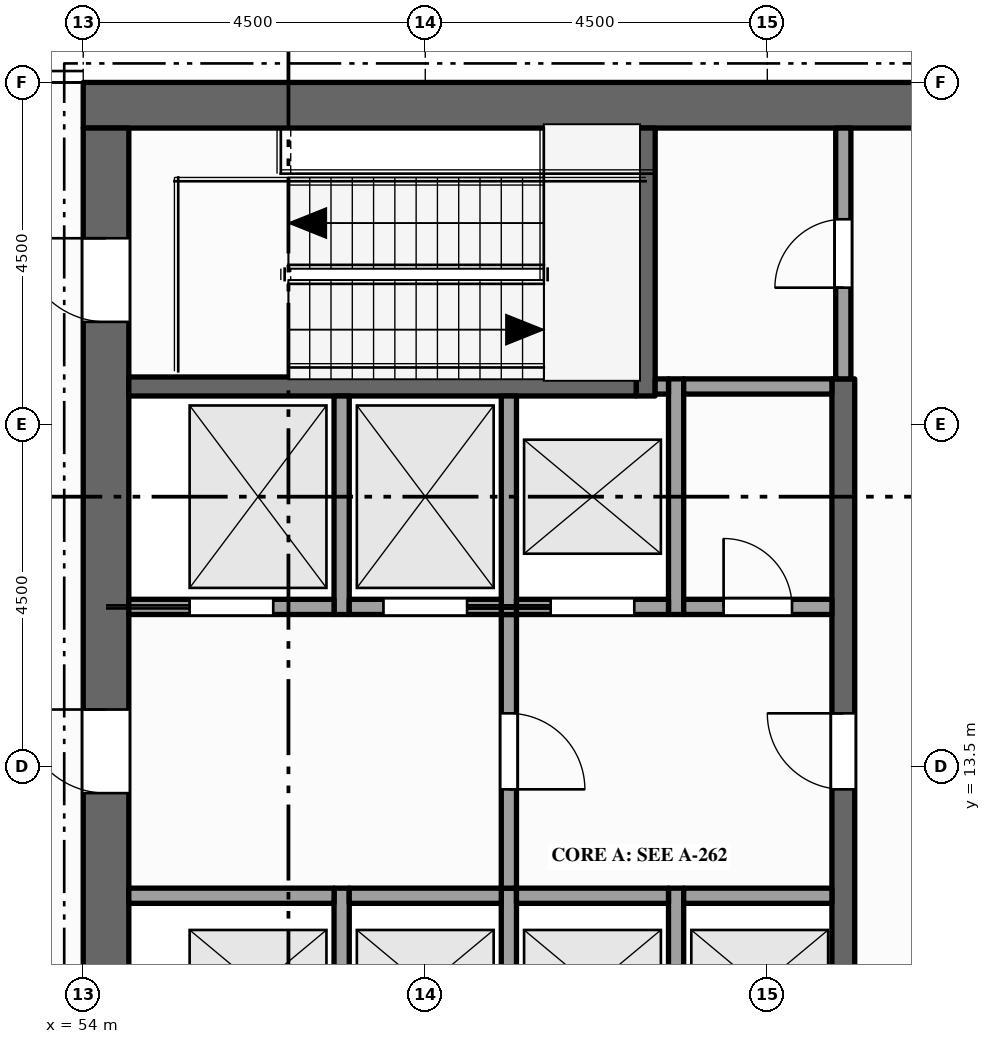
"""IFC4 building model, lengths in metres.
Left out: names, types, materials, properties, quantities, classifications, styles, units other than length and angle.
Written with IfcOpenShell. Run it as: python <this file> out.ifc"""

import sys

from ifc_helpers import new_model, si_unit, direction, frame, frame_2d, origin, place, context, subcontext, project, spatial, rectangle, extrude, element, fill, save


model = new_model("IFC4")
c1 = context("Model", 3, precision=1e-05, world=origin(), true_north=direction((0.0, 1.0)))
c2 = subcontext(c1, "Body", "Model", "MODEL_VIEW")
j1 = project(units=[si_unit("LENGTHUNIT", "METRE"), si_unit("PLANEANGLEUNIT", "RADIAN")], contexts=[c1])
p1 = place(None, origin())
s1 = spatial("IfcSite", under=j1, at=p1, CompositionType="ELEMENT")
p2 = place(p1, origin())
s2 = spatial("IfcBuilding", under=s1, at=p2, CompositionType="ELEMENT")
p3 = place(p2, frame((0.0, 0.0, 341.0)))
s3 = spatial("IfcBuildingStorey", under=s2, at=p3, CompositionType="ELEMENT", Elevation=341.0)
p4 = place(p3, frame((54.0, 22.2, -0.15), z_axis=(0.0, 0.0, 1.0), x_axis=(1.0, 0.0, 0.0)))
e1 = element("IfcWall", 1, at=p4, inside=s3, PredefinedType="SHEAR", context=c2, shape_type="SweptSolid", body=[
    extrude(rectangle(XDim=13.5, YDim=0.6, at=frame_2d((6.75, 0.0))), origin(), (0.0, 0.0, 1.0), 4.5),
])
p5 = place(p3, frame((54.3, 0.6, -0.15), z_axis=(0.0, 0.0, 1.0), x_axis=(0.0, 1.0, 0.0)))
e2 = element("IfcWall", 2, at=p5, inside=s3, PredefinedType="SHEAR", context=c2, shape_type="SweptSolid", body=[
    extrude(rectangle(XDim=21.3, YDim=0.6, at=frame_2d((10.65, 0.0))), origin(), (0.0, 0.0, 1.0), 4.5),
])
p6 = place(p5, frame((6.5, 0.0, 0.15)))
e3 = element("IfcOpeningElement", 3, at=p6, cuts=e2, PredefinedType="OPENING", context=c2, shape_type="SweptSolid", body=[
    extrude(rectangle(XDim=1.8, YDim=2.1, at=frame_2d((0.9, 1.05))), frame((0.0, 0.31, 0.0), z_axis=(0.0, -1.0, 0.0), x_axis=(1.0, 0.0, 0.0)), (0.0, 0.0, 1.0), 0.62),
])
p7 = place(p5, frame((12.55, 0.0, 0.15)))
e4 = element("IfcOpeningElement", 4, at=p7, cuts=e2, PredefinedType="OPENING", context=c2, shape_type="SweptSolid", body=[
    extrude(rectangle(XDim=1.1, YDim=2.1, at=frame_2d((0.55, 1.05))), frame((0.0, 0.31, 0.0), z_axis=(0.0, -1.0, 0.0), x_axis=(1.0, 0.0, 0.0)), (0.0, 0.0, 1.0), 0.62),
])
p8 = place(p5, frame((1.55, 0.0, 0.15)))
e5 = element("IfcOpeningElement", 5, at=p8, cuts=e2, PredefinedType="OPENING", context=c2, shape_type="SweptSolid", body=[
    extrude(rectangle(XDim=1.1, YDim=2.1, at=frame_2d((0.55, 1.05))), frame((0.0, 0.31, 0.0), z_axis=(0.0, -1.0, 0.0), x_axis=(1.0, 0.0, 0.0)), (0.0, 0.0, 1.0), 0.62),
])
p9 = place(p5, frame((18.75, 0.0, 0.15)))
e6 = element("IfcOpeningElement", 6, at=p9, cuts=e2, PredefinedType="OPENING", context=c2, shape_type="SweptSolid", body=[
    extrude(rectangle(XDim=1.1, YDim=2.1, at=frame_2d((0.55, 1.05))), frame((0.0, 0.31, 0.0), z_axis=(0.0, -1.0, 0.0), x_axis=(1.0, 0.0, 0.0)), (0.0, 0.0, 1.0), 0.62),
])
p10 = place(p3, frame((57.4, 9.3, 0.0), z_axis=(0.0, 0.0, 1.0), x_axis=(0.0, 1.0, 0.0)))
e7 = element("IfcWall", 7, at=p10, inside=s3, PredefinedType="SOLIDWALL", context=c2, shape_type="SweptSolid", body=[
    extrude(rectangle(XDim=2.6, YDim=0.2, at=frame_2d((1.3, 0.0))), origin(), (0.0, 0.0, 1.0), 4.3),
])
p11 = place(p3, frame((57.4, 15.5, 0.0), z_axis=(0.0, 0.0, 1.0), x_axis=(0.0, 1.0, 0.0)))
e8 = element("IfcWall", 8, at=p11, inside=s3, PredefinedType="SOLIDWALL", context=c2, shape_type="SweptSolid", body=[
    extrude(rectangle(XDim=2.875, YDim=0.2, at=frame_2d((1.438, 0.0))), origin(), (0.0, 0.0, 1.0), 4.3),
])
p12 = place(p3, frame((59.6, 9.3, 0.0), z_axis=(0.0, 0.0, 1.0), x_axis=(0.0, 1.0, 0.0)))
e9 = element("IfcWall", 9, at=p12, inside=s3, PredefinedType="SOLIDWALL", context=c2, shape_type="SweptSolid", body=[
    extrude(rectangle(XDim=2.6, YDim=0.2, at=frame_2d((1.3, 0.0))), origin(), (0.0, 0.0, 1.0), 4.3),
])
p13 = place(p3, frame((59.6, 11.9, 0.0), z_axis=(0.0, 0.0, 1.0), x_axis=(0.0, 1.0, 0.0)))
e10 = element("IfcWall", 10, at=p13, inside=s3, PredefinedType="PARTITIONING", context=c2, shape_type="SweptSolid", body=[
    extrude(rectangle(XDim=3.6, YDim=0.2, at=frame_2d((1.8, 0.0))), origin(), (0.0, 0.0, 1.0), 4.3),
])
p14 = place(p13, frame((1.3, 0.0, 0.0)))
e11 = element("IfcOpeningElement", 11, at=p14, cuts=e10, PredefinedType="OPENING", context=c2, shape_type="SweptSolid", body=[
    extrude(rectangle(XDim=1.0, YDim=2.1, at=frame_2d((0.5, 1.05))), frame((0.0, 0.11, 0.0), z_axis=(0.0, -1.0, 0.0), x_axis=(1.0, 0.0, 0.0)), (0.0, 0.0, 1.0), 0.22),
])
p15 = place(p3, frame((59.6, 15.5, 0.0), z_axis=(0.0, 0.0, 1.0), x_axis=(0.0, 1.0, 0.0)))
e12 = element("IfcWall", 12, at=p15, inside=s3, PredefinedType="SOLIDWALL", context=c2, shape_type="SweptSolid", body=[
    extrude(rectangle(XDim=2.875, YDim=0.2, at=frame_2d((1.438, 0.0))), origin(), (0.0, 0.0, 1.0), 4.3),
])
p16 = place(p3, frame((61.4, 18.375, 0.0), z_axis=(0.0, 0.0, 1.0), x_axis=(0.0, 1.0, 0.0)))
e13 = element("IfcWall", 13, at=p16, inside=s3, PredefinedType="SHEAR", context=c2, shape_type="SweptSolid", body=[
    extrude(rectangle(XDim=3.525, YDim=0.25, at=frame_2d((1.762, 0.0))), origin(), (0.0, 0.0, 1.0), 4.3),
])
p17 = place(p3, frame((61.8, 9.3, 0.0), z_axis=(0.0, 0.0, 1.0), x_axis=(0.0, 1.0, 0.0)))
e14 = element("IfcWall", 14, at=p17, inside=s3, PredefinedType="SOLIDWALL", context=c2, shape_type="SweptSolid", body=[
    extrude(rectangle(XDim=2.6, YDim=0.2, at=frame_2d((1.3, 0.0))), origin(), (0.0, 0.0, 1.0), 4.3),
])
p18 = place(p3, frame((61.8, 15.5, 0.0), z_axis=(0.0, 0.0, 1.0), x_axis=(0.0, 1.0, 0.0)))
e15 = element("IfcWall", 15, at=p18, inside=s3, PredefinedType="SOLIDWALL", context=c2, shape_type="SweptSolid", body=[
    extrude(rectangle(XDim=3.1, YDim=0.2, at=frame_2d((1.55, 0.0))), origin(), (0.0, 0.0, 1.0), 4.3),
])
p19 = place(p3, frame((64.0, 4.1, 0.0), z_axis=(0.0, 0.0, 1.0), x_axis=(0.0, 1.0, 0.0)))
e16 = element("IfcWall", 16, at=p19, inside=s3, PredefinedType="SHEAR", context=c2, shape_type="SweptSolid", body=[
    extrude(rectangle(XDim=14.5, YDim=0.3, at=frame_2d((7.25, 0.0))), origin(), (0.0, 0.0, 1.0), 4.3),
])
p20 = place(p19, frame((3.4, 0.0, 0.0)))
e17 = element("IfcOpeningElement", 17, at=p20, cuts=e16, PredefinedType="OPENING", context=c2, shape_type="SweptSolid", body=[
    extrude(rectangle(XDim=1.0, YDim=2.1, at=frame_2d((0.5, 1.05))), frame((0.0, 0.16, 0.0), z_axis=(0.0, -1.0, 0.0), x_axis=(1.0, 0.0, 0.0)), (0.0, 0.0, 1.0), 0.32),
])
p21 = place(p19, frame((9.1, 0.0, 0.0)))
e18 = element("IfcOpeningElement", 18, at=p21, cuts=e16, PredefinedType="OPENING", context=c2, shape_type="SweptSolid", body=[
    extrude(rectangle(XDim=1.0, YDim=2.1, at=frame_2d((0.5, 1.05))), frame((0.0, 0.16, 0.0), z_axis=(0.0, -1.0, 0.0), x_axis=(1.0, 0.0, 0.0)), (0.0, 0.0, 1.0), 0.32),
])
p22 = place(p3, frame((64.0, 18.6, 0.0), z_axis=(0.0, 0.0, 1.0), x_axis=(0.0, 1.0, 0.0)))
e19 = element("IfcWall", 19, at=p22, inside=s3, PredefinedType="PARTITIONING", context=c2, shape_type="SweptSolid", body=[
    extrude(rectangle(XDim=3.3, YDim=0.2, at=frame_2d((1.65, 0.0))), origin(), (0.0, 0.0, 1.0), 4.3),
])
p23 = place(p22, frame((1.2, 0.0, 0.0)))
e20 = element("IfcOpeningElement", 20, at=p23, cuts=e19, PredefinedType="OPENING", context=c2, shape_type="SweptSolid", body=[
    extrude(rectangle(XDim=0.9, YDim=2.1, at=frame_2d((0.45, 1.05))), frame((0.0, 0.11, 0.0), z_axis=(0.0, -1.0, 0.0), x_axis=(1.0, 0.0, 0.0)), (0.0, 0.0, 1.0), 0.22),
])
p24 = place(p3, frame((54.6, 11.8, 0.0), z_axis=(0.0, 0.0, 1.0), x_axis=(1.0, 0.0, 0.0)))
e21 = element("IfcWall", 21, at=p24, inside=s3, PredefinedType="SOLIDWALL", context=c2, shape_type="SweptSolid", body=[
    extrude(rectangle(XDim=2.7, YDim=0.2, at=frame_2d((1.35, 0.0))), origin(), (0.0, 0.0, 1.0), 4.3),
])
for number, where, z_axis, x_axis in (
    (22, (57.5, 11.8, 0.0), (0.0, 0.0, 1.0), (1.0, 0.0, 0.0)),
    (23, (59.7, 11.8, 0.0), (0.0, 0.0, 1.0), (1.0, 0.0, 0.0)),
):
    element("IfcWall", number, at=place(p3, frame(where, z_axis=z_axis, x_axis=x_axis)), inside=s3, PredefinedType="SOLIDWALL", context=c2, shape_type="SweptSolid", body=[
        extrude(rectangle(XDim=2.0, YDim=0.2, at=frame_2d((1.0, 0.0))), origin(), (0.0, 0.0, 1.0), 4.3),
    ])
p25 = place(p3, frame((61.9, 11.8, 0.0), z_axis=(0.0, 0.0, 1.0), x_axis=(1.0, 0.0, 0.0)))
e24 = element("IfcWall", 24, at=p25, inside=s3, PredefinedType="SOLIDWALL", context=c2, shape_type="SweptSolid", body=[
    extrude(rectangle(XDim=1.95, YDim=0.2, at=frame_2d((0.975, 0.0))), origin(), (0.0, 0.0, 1.0), 4.3),
])
p26 = place(p3, frame((54.6, 15.6, 0.0), z_axis=(0.0, 0.0, 1.0), x_axis=(1.0, 0.0, 0.0)))
e25 = element("IfcWall", 25, at=p26, inside=s3, PredefinedType="SOLIDWALL", context=c2, shape_type="SweptSolid", body=[
    extrude(rectangle(XDim=2.7, YDim=0.2, at=frame_2d((1.35, 0.0))), origin(), (0.0, 0.0, 1.0), 4.3),
])
p27 = place(p26, frame((0.8, 0.0, 0.012)))
e26 = element("IfcOpeningElement", 26, at=p27, cuts=e25, PredefinedType="OPENING", context=c2, shape_type="SweptSolid", body=[
    extrude(rectangle(XDim=1.1, YDim=2.1, at=frame_2d((0.55, 1.05))), frame((0.0, 0.11, 0.0), z_axis=(0.0, -1.0, 0.0), x_axis=(1.0, 0.0, 0.0)), (0.0, 0.0, 1.0), 0.22),
])
p28 = place(p3, frame((57.5, 15.6, 0.0), z_axis=(0.0, 0.0, 1.0), x_axis=(1.0, 0.0, 0.0)))
e27 = element("IfcWall", 27, at=p28, inside=s3, PredefinedType="SOLIDWALL", context=c2, shape_type="SweptSolid", body=[
    extrude(rectangle(XDim=2.0, YDim=0.2, at=frame_2d((1.0, 0.0))), origin(), (0.0, 0.0, 1.0), 4.3),
])
p29 = place(p28, frame((0.45, 0.0, 0.012)))
e28 = element("IfcOpeningElement", 28, at=p29, cuts=e27, PredefinedType="OPENING", context=c2, shape_type="SweptSolid", body=[
    extrude(rectangle(XDim=1.1, YDim=2.1, at=frame_2d((0.55, 1.05))), frame((0.0, 0.11, 0.0), z_axis=(0.0, -1.0, 0.0), x_axis=(1.0, 0.0, 0.0)), (0.0, 0.0, 1.0), 0.22),
])
p30 = place(p3, frame((59.7, 15.6, 0.0), z_axis=(0.0, 0.0, 1.0), x_axis=(1.0, 0.0, 0.0)))
e29 = element("IfcWall", 29, at=p30, inside=s3, PredefinedType="SOLIDWALL", context=c2, shape_type="SweptSolid", body=[
    extrude(rectangle(XDim=2.0, YDim=0.2, at=frame_2d((1.0, 0.0))), origin(), (0.0, 0.0, 1.0), 4.3),
])
p31 = place(p30, frame((0.45, 0.0, 0.012)))
e30 = element("IfcOpeningElement", 30, at=p31, cuts=e29, PredefinedType="OPENING", context=c2, shape_type="SweptSolid", body=[
    extrude(rectangle(XDim=1.1, YDim=2.1, at=frame_2d((0.55, 1.05))), frame((0.0, 0.11, 0.0), z_axis=(0.0, -1.0, 0.0), x_axis=(1.0, 0.0, 0.0)), (0.0, 0.0, 1.0), 0.22),
])
p32 = place(p3, frame((61.9, 15.6, 0.0), z_axis=(0.0, 0.0, 1.0), x_axis=(1.0, 0.0, 0.0)))
e31 = element("IfcWall", 31, at=p32, inside=s3, PredefinedType="PARTITIONING", context=c2, shape_type="SweptSolid", body=[
    extrude(rectangle(XDim=1.95, YDim=0.2, at=frame_2d((0.975, 0.0))), origin(), (0.0, 0.0, 1.0), 4.3),
])
p33 = place(p32, frame((0.525, 0.0, 0.0)))
e32 = element("IfcOpeningElement", 32, at=p33, cuts=e31, PredefinedType="OPENING", context=c2, shape_type="SweptSolid", body=[
    extrude(rectangle(XDim=0.9, YDim=2.1, at=frame_2d((0.45, 1.05))), frame((0.0, 0.11, 0.0), z_axis=(0.0, -1.0, 0.0), x_axis=(1.0, 0.0, 0.0)), (0.0, 0.0, 1.0), 0.22),
])
p34 = place(p3, frame((54.6, 18.5, 0.0), z_axis=(0.0, 0.0, 1.0), x_axis=(1.0, 0.0, 0.0)))
e33 = element("IfcWall", 33, at=p34, inside=s3, PredefinedType="SHEAR", context=c2, shape_type="SweptSolid", body=[
    extrude(rectangle(XDim=6.675, YDim=0.25, at=frame_2d((3.337, 0.0))), origin(), (0.0, 0.0, 1.0), 4.3),
])
p35 = place(p3, frame((61.525, 18.5, 0.0), z_axis=(0.0, 0.0, 1.0), x_axis=(1.0, 0.0, 0.0)))
e34 = element("IfcWall", 34, at=p35, inside=s3, PredefinedType="SOLIDWALL", context=c2, shape_type="SweptSolid", body=[
    extrude(rectangle(XDim=0.175, YDim=0.2, at=frame_2d((0.087, 0.0))), origin(), (0.0, 0.0, 1.0), 4.3),
])
p36 = place(p3, frame((61.9, 18.5, 0.0), z_axis=(0.0, 0.0, 1.0), x_axis=(1.0, 0.0, 0.0)))
e35 = element("IfcWall", 35, at=p36, inside=s3, PredefinedType="PARTITIONING", context=c2, shape_type="SweptSolid", body=[
    extrude(rectangle(XDim=1.95, YDim=0.2, at=frame_2d((0.975, 0.0))), origin(), (0.0, 0.0, 1.0), 4.3),
])
p37 = place(p27, origin())
e36 = element("IfcDoor", 36, at=p37, inside=s3, OperationType="SLIDING_TO_LEFT", PredefinedType="DOOR", context=c2, shape_type="SweptSolid", body=[
    extrude(rectangle(XDim=1.1, YDim=2.1, at=frame_2d((0.55, 1.05))), frame((0.0, 0.025, 0.0), z_axis=(0.0, -1.0, 0.0), x_axis=(1.0, 0.0, 0.0)), (0.0, 0.0, 1.0), 0.05),
])
fill(e26, e36)
p38 = place(p29, origin())
e37 = element("IfcDoor", 37, at=p38, inside=s3, OperationType="SLIDING_TO_RIGHT", PredefinedType="DOOR", context=c2, shape_type="SweptSolid", body=[
    extrude(rectangle(XDim=1.1, YDim=2.1, at=frame_2d((0.55, 1.05))), frame((0.0, 0.025, 0.0), z_axis=(0.0, -1.0, 0.0), x_axis=(1.0, 0.0, 0.0)), (0.0, 0.0, 1.0), 0.05),
])
fill(e28, e37)
p39 = place(p31, origin())
e38 = element("IfcDoor", 38, at=p39, inside=s3, OperationType="SLIDING_TO_LEFT", PredefinedType="DOOR", context=c2, shape_type="SweptSolid", body=[
    extrude(rectangle(XDim=1.1, YDim=2.1, at=frame_2d((0.55, 1.05))), frame((0.0, 0.025, 0.0), z_axis=(0.0, -1.0, 0.0), x_axis=(1.0, 0.0, 0.0)), (0.0, 0.0, 1.0), 0.05),
])
fill(e30, e38)
p40 = place(p7, origin())
e39 = element("IfcDoor", 39, at=p40, inside=s3, OperationType="SINGLE_SWING_RIGHT", PredefinedType="DOOR", context=c2, shape_type="SweptSolid", body=[
    extrude(rectangle(XDim=1.1, YDim=2.1, at=frame_2d((0.55, 1.05))), frame((0.0, 0.025, 0.0), z_axis=(0.0, -1.0, 0.0), x_axis=(1.0, 0.0, 0.0)), (0.0, 0.0, 1.0), 0.05),
])
fill(e4, e39)
p41 = place(p14, origin())
e40 = element("IfcDoor", 40, at=p41, inside=s3, OperationType="SINGLE_SWING_LEFT", PredefinedType="DOOR", context=c2, shape_type="SweptSolid", body=[
    extrude(rectangle(XDim=1.0, YDim=2.1, at=frame_2d((0.5, 1.05))), frame((0.0, 0.025, 0.0), z_axis=(0.0, -1.0, 0.0), x_axis=(1.0, 0.0, 0.0)), (0.0, 0.0, 1.0), 0.05),
])
fill(e11, e40)
p42 = place(p21, origin())
e41 = element("IfcDoor", 41, at=p42, inside=s3, OperationType="SINGLE_SWING_RIGHT", PredefinedType="DOOR", context=c2, shape_type="SweptSolid", body=[
    extrude(rectangle(XDim=1.0, YDim=2.1, at=frame_2d((0.5, 1.05))), frame((0.0, 0.025, 0.0), z_axis=(0.0, -1.0, 0.0), x_axis=(1.0, 0.0, 0.0)), (0.0, 0.0, 1.0), 0.05),
])
fill(e18, e41)
p43 = place(p9, origin())
e42 = element("IfcDoor", 42, at=p43, inside=s3, OperationType="SINGLE_SWING_RIGHT", PredefinedType="DOOR", context=c2, shape_type="SweptSolid", body=[
    extrude(rectangle(XDim=1.1, YDim=2.1, at=frame_2d((0.55, 1.05))), frame((0.0, 0.025, 0.0), z_axis=(0.0, -1.0, 0.0), x_axis=(1.0, 0.0, 0.0)), (0.0, 0.0, 1.0), 0.05),
])
fill(e6, e42)
p44 = place(p23, origin())
e43 = element("IfcDoor", 43, at=p44, inside=s3, OperationType="SINGLE_SWING_LEFT", PredefinedType="DOOR", context=c2, shape_type="SweptSolid", body=[
    extrude(rectangle(XDim=0.9, YDim=2.1, at=frame_2d((0.45, 1.05))), frame((0.0, 0.025, 0.0), z_axis=(0.0, -1.0, 0.0), x_axis=(1.0, 0.0, 0.0)), (0.0, 0.0, 1.0), 0.05),
])
fill(e20, e43)
p45 = place(p33, origin())
e44 = element("IfcDoor", 44, at=p45, inside=s3, OperationType="SINGLE_SWING_LEFT", PredefinedType="DOOR", context=c2, shape_type="SweptSolid", body=[
    extrude(rectangle(XDim=0.9, YDim=2.1, at=frame_2d((0.45, 1.05))), frame((0.0, 0.025, 0.0), z_axis=(0.0, -1.0, 0.0), x_axis=(1.0, 0.0, 0.0)), (0.0, 0.0, 1.0), 0.05),
])
fill(e32, e44)
save(model, sys.argv[1])
